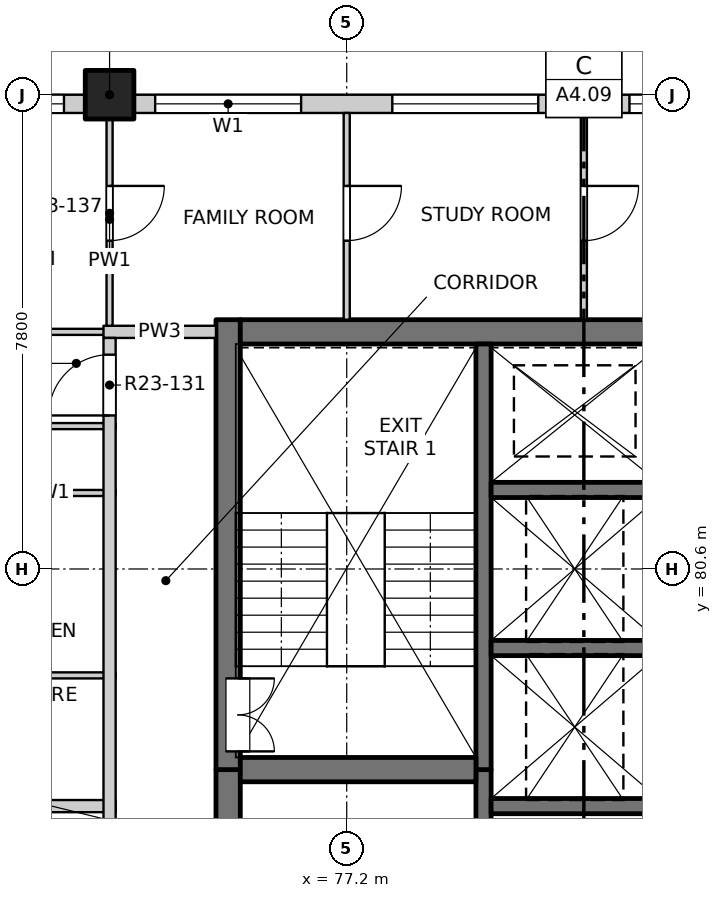
"""IFC4 building model, lengths in metres.
Left out: names, types, materials, properties, quantities, classifications, styles, units other than length and angle.
Written with IfcOpenShell. Run it as: python <this file> out.ifc"""

import sys

from ifc_helpers import new_model, si_unit, direction, frame, frame_2d, origin, origin_2d, place, context, subcontext, project, spatial, rectangle, extrude, element, fill, save


model = new_model("IFC4")
c1 = context("Model", 3, precision=1e-05, world=origin(), true_north=direction((0.0, 1.0)))
c2 = subcontext(c1, "Body", "Model", "MODEL_VIEW")
j1 = project(units=[si_unit("LENGTHUNIT", "METRE"), si_unit("PLANEANGLEUNIT", "RADIAN")], contexts=[c1])
p1 = place(None, origin())
s1 = spatial("IfcSite", under=j1, at=p1, CompositionType="ELEMENT")
p2 = place(p1, origin())
s2 = spatial("IfcBuilding", under=s1, at=p2, CompositionType="ELEMENT")
p3 = place(p2, frame((0.0, 0.0, 238.1)))
s3 = spatial("IfcBuildingStorey", under=s2, at=p3, CompositionType="ELEMENT", Elevation=238.1)
p4 = place(p3, frame((73.3, 88.4, -0.25), z_axis=(0.0, 0.0, 1.0), x_axis=(1.0, 0.0, 0.0)))
e1 = element("IfcColumn", 1, at=p4, inside=s3, PredefinedType="COLUMN", context=c2, shape_type="SweptSolid", body=[
    extrude(rectangle(XDim=0.8, YDim=0.8, at=origin_2d()), origin(), (0.0, 0.0, 1.0), 3.35),
])
p5 = place(p3, frame((75.25, 55.05, -0.25), z_axis=(0.0, 0.0, 1.0), x_axis=(0.0, 1.0, 0.0)))
e2 = element("IfcWall", 2, at=p5, inside=s3, PredefinedType="SOLIDWALL", context=c2, shape_type="SweptSolid", body=[
    extrude(rectangle(XDim=22.25, YDim=0.4, at=frame_2d((11.125, 0.0))), origin(), (0.0, 0.0, 1.0), 3.35),
])
p6 = place(p5, frame((7.4, 0.0, 0.25)))
e3 = element("IfcOpeningElement", 3, at=p6, cuts=e2, PredefinedType="OPENING", context=c2, shape_type="SweptSolid", body=[
    extrude(rectangle(XDim=0.9, YDim=2.1, at=frame_2d((0.45, 1.05))), frame((0.0, 0.21, 0.0), z_axis=(0.0, -1.0, 0.0), x_axis=(1.0, 0.0, 0.0)), (0.0, 0.0, 1.0), 0.42),
])
p7 = place(p5, frame((12.05, 0.0, 0.25)))
e4 = element("IfcOpeningElement", 4, at=p7, cuts=e2, PredefinedType="OPENING", context=c2, shape_type="SweptSolid", body=[
    extrude(rectangle(XDim=0.9, YDim=2.1, at=frame_2d((0.45, 1.05))), frame((0.0, 0.21, 0.0), z_axis=(0.0, -1.0, 0.0), x_axis=(1.0, 0.0, 0.0)), (0.0, 0.0, 1.0), 0.42),
])
p8 = place(p5, frame((16.55, 0.0, 0.25)))
e5 = element("IfcOpeningElement", 5, at=p8, cuts=e2, PredefinedType="OPENING", context=c2, shape_type="SweptSolid", body=[
    extrude(rectangle(XDim=0.9, YDim=2.1, at=frame_2d((0.45, 1.05))), frame((0.0, 0.21, 0.0), z_axis=(0.0, -1.0, 0.0), x_axis=(1.0, 0.0, 0.0)), (0.0, 0.0, 1.0), 0.42),
])
p9 = place(p5, frame((20.0, 0.0, 0.25)))
e6 = element("IfcOpeningElement", 6, at=p9, cuts=e2, PredefinedType="OPENING", context=c2, shape_type="SweptSolid", body=[
    extrude(rectangle(XDim=0.9, YDim=2.1, at=frame_2d((0.45, 1.05))), frame((0.0, 0.21, 0.0), z_axis=(0.0, -1.0, 0.0), x_axis=(1.0, 0.0, 0.0)), (0.0, 0.0, 1.0), 0.42),
])
p10 = place(p3, frame((75.25, 77.3, -0.25), z_axis=(0.0, 0.0, 1.0), x_axis=(0.0, 1.0, 0.0)))
e7 = element("IfcWall", 7, at=p10, inside=s3, PredefinedType="SOLIDWALL", context=c2, shape_type="SweptSolid", body=[
    extrude(rectangle(XDim=7.4, YDim=0.4, at=frame_2d((3.7, 0.0))), origin(), (0.0, 0.0, 1.0), 3.35),
])
p11 = place(p10, frame((0.3, 0.0, 0.25)))
e8 = element("IfcOpeningElement", 8, at=p11, cuts=e7, PredefinedType="OPENING", context=c2, shape_type="SweptSolid", body=[
    extrude(rectangle(XDim=1.2, YDim=2.1, at=frame_2d((0.6, 1.05))), frame((0.0, 0.21, 0.0), z_axis=(0.0, -1.0, 0.0), x_axis=(1.0, 0.0, 0.0)), (0.0, 0.0, 1.0), 0.42),
])
p12 = place(p3, frame((75.45, 84.5, -0.25), z_axis=(0.0, 0.0, 1.0), x_axis=(1.0, 0.0, 0.0)))
e9 = element("IfcWall", 9, at=p12, inside=s3, PredefinedType="SOLIDWALL", context=c2, shape_type="SweptSolid", body=[
    extrude(rectangle(XDim=19.1, YDim=0.4, at=frame_2d((9.55, 0.0))), origin(), (0.0, 0.0, 1.0), 3.35),
])
p13 = place(p3, frame((79.45, 60.975, -0.25), z_axis=(0.0, 0.0, 1.0), x_axis=(0.0, 1.0, 0.0)))
e10 = element("IfcWall", 10, at=p13, inside=s3, PredefinedType="SOLIDWALL", context=c2, shape_type="SweptSolid", body=[
    extrude(rectangle(XDim=16.325, YDim=0.25, at=frame_2d((8.163, 0.0))), origin(), (0.0, 0.0, 1.0), 3.35),
])
p14 = place(p3, frame((79.45, 77.3, -0.25), z_axis=(0.0, 0.0, 1.0), x_axis=(0.0, 1.0, 0.0)))
e11 = element("IfcWall", 11, at=p14, inside=s3, PredefinedType="SOLIDWALL", context=c2, shape_type="SweptSolid", body=[
    extrude(rectangle(XDim=7.0, YDim=0.25, at=frame_2d((3.5, 0.0))), origin(), (0.0, 0.0, 1.0), 3.35),
])
for number, where, z_axis, x_axis in (
    (12, (79.575, 76.7, -0.25), (0.0, 0.0, 1.0), (1.0, 0.0, 0.0)),
    (13, (79.575, 79.3, -0.25), (0.0, 0.0, 1.0), (1.0, 0.0, 0.0)),
    (14, (79.575, 81.9, -0.25), (0.0, 0.0, 1.0), (1.0, 0.0, 0.0)),
):
    element("IfcWall", number, at=place(p3, frame(where, z_axis=z_axis, x_axis=x_axis)), inside=s3, PredefinedType="SOLIDWALL", context=c2, shape_type="SweptSolid", body=[
        extrude(rectangle(XDim=3.0, YDim=0.25, at=frame_2d((1.5, 0.0))), origin(), (0.0, 0.0, 1.0), 3.35),
    ])
p15 = place(p3, frame((75.45, 77.3, -0.25), z_axis=(0.0, 0.0, 1.0), x_axis=(1.0, 0.0, 0.0)))
e15 = element("IfcWall", 15, at=p15, inside=s3, PredefinedType="SOLIDWALL", context=c2, shape_type="SweptSolid", body=[
    extrude(rectangle(XDim=3.875, YDim=0.4, at=frame_2d((1.938, 0.0))), origin(), (0.0, 0.0, 1.0), 3.35),
])
p16 = place(p3, frame((65.5, 88.25, 0.0), z_axis=(0.0, 0.0, 1.0), x_axis=(1.0, 0.0, 0.0)))
e16 = element("IfcWall", 16, at=p16, inside=s3, PredefinedType="SOLIDWALL", context=c2, shape_type="SweptSolid", body=[
    extrude(rectangle(XDim=7.4, YDim=0.3, at=frame_2d((3.7, 0.0))), origin(), (0.0, 0.0, 1.0), 3.1),
])
p17 = place(p16, frame((0.75, 0.0, 0.9)))
e17 = element("IfcOpeningElement", 17, at=p17, cuts=e16, PredefinedType="OPENING", context=c2, shape_type="SweptSolid", body=[
    extrude(rectangle(XDim=2.4, YDim=1.8, at=frame_2d((1.2, 0.9))), frame((0.0, 0.16, 0.0), z_axis=(0.0, -1.0, 0.0), x_axis=(1.0, 0.0, 0.0)), (0.0, 0.0, 1.0), 0.32),
])
p18 = place(p16, frame((4.65, 0.0, 0.9)))
e18 = element("IfcOpeningElement", 18, at=p18, cuts=e16, PredefinedType="OPENING", context=c2, shape_type="SweptSolid", body=[
    extrude(rectangle(XDim=2.4, YDim=1.8, at=frame_2d((1.2, 0.9))), frame((0.0, 0.16, 0.0), z_axis=(0.0, -1.0, 0.0), x_axis=(1.0, 0.0, 0.0)), (0.0, 0.0, 1.0), 0.32),
])
p19 = place(p3, frame((73.7, 88.25, 0.0), z_axis=(0.0, 0.0, 1.0), x_axis=(1.0, 0.0, 0.0)))
e19 = element("IfcWall", 19, at=p19, inside=s3, PredefinedType="SOLIDWALL", context=c2, shape_type="SweptSolid", body=[
    extrude(rectangle(XDim=22.6, YDim=0.3, at=frame_2d((11.3, 0.0))), origin(), (0.0, 0.0, 1.0), 3.1),
])
p20 = place(p19, frame((0.35, 0.0, 0.9)))
e20 = element("IfcOpeningElement", 20, at=p20, cuts=e19, PredefinedType="OPENING", context=c2, shape_type="SweptSolid", body=[
    extrude(rectangle(XDim=2.4, YDim=1.8, at=frame_2d((1.2, 0.9))), frame((0.0, 0.16, 0.0), z_axis=(0.0, -1.0, 0.0), x_axis=(1.0, 0.0, 0.0)), (0.0, 0.0, 1.0), 0.32),
])
p21 = place(p19, frame((4.25, 0.0, 0.9)))
e21 = element("IfcOpeningElement", 21, at=p21, cuts=e19, PredefinedType="OPENING", context=c2, shape_type="SweptSolid", body=[
    extrude(rectangle(XDim=2.4, YDim=1.8, at=frame_2d((1.2, 0.9))), frame((0.0, 0.16, 0.0), z_axis=(0.0, -1.0, 0.0), x_axis=(1.0, 0.0, 0.0)), (0.0, 0.0, 1.0), 0.32),
])
p22 = place(p19, frame((8.15, 0.0, 0.9)))
e22 = element("IfcOpeningElement", 22, at=p22, cuts=e19, PredefinedType="OPENING", context=c2, shape_type="SweptSolid", body=[
    extrude(rectangle(XDim=2.4, YDim=1.8, at=frame_2d((1.2, 0.9))), frame((0.0, 0.16, 0.0), z_axis=(0.0, -1.0, 0.0), x_axis=(1.0, 0.0, 0.0)), (0.0, 0.0, 1.0), 0.32),
])
p23 = place(p19, frame((12.05, 0.0, 0.9)))
e23 = element("IfcOpeningElement", 23, at=p23, cuts=e19, PredefinedType="OPENING", context=c2, shape_type="SweptSolid", body=[
    extrude(rectangle(XDim=2.4, YDim=1.8, at=frame_2d((1.2, 0.9))), frame((0.0, 0.16, 0.0), z_axis=(0.0, -1.0, 0.0), x_axis=(1.0, 0.0, 0.0)), (0.0, 0.0, 1.0), 0.32),
])
p24 = place(p19, frame((15.95, 0.0, 0.9)))
e24 = element("IfcOpeningElement", 24, at=p24, cuts=e19, PredefinedType="OPENING", context=c2, shape_type="SweptSolid", body=[
    extrude(rectangle(XDim=2.4, YDim=1.8, at=frame_2d((1.2, 0.9))), frame((0.0, 0.16, 0.0), z_axis=(0.0, -1.0, 0.0), x_axis=(1.0, 0.0, 0.0)), (0.0, 0.0, 1.0), 0.32),
])
p25 = place(p19, frame((19.85, 0.0, 0.9)))
e25 = element("IfcOpeningElement", 25, at=p25, cuts=e19, PredefinedType="OPENING", context=c2, shape_type="SweptSolid", body=[
    extrude(rectangle(XDim=2.4, YDim=1.8, at=frame_2d((1.2, 0.9))), frame((0.0, 0.16, 0.0), z_axis=(0.0, -1.0, 0.0), x_axis=(1.0, 0.0, 0.0)), (0.0, 0.0, 1.0), 0.32),
])
p26 = place(p3, frame((61.9, 76.7, 0.0), z_axis=(0.0, 0.0, 1.0), x_axis=(1.0, 0.0, 0.0)))
e26 = element("IfcWall", 26, at=p26, inside=s3, PredefinedType="PARTITIONING", context=c2, shape_type="SweptSolid", body=[
    extrude(rectangle(XDim=11.5, YDim=0.2, at=frame_2d((5.75, 0.0))), origin(), (0.0, 0.0, 1.0), 3.1),
])
for number, where, z_axis, x_axis in (
    (27, (71.18, 78.85, 0.0), (0.0, 0.0, 1.0), (1.0, 0.0, 0.0)),
    (28, (71.18, 81.85, 0.0), (0.0, 0.0, 1.0), (1.0, 0.0, 0.0)),
    (29, (71.18, 82.95, 0.0), (0.0, 0.0, 1.0), (1.0, 0.0, 0.0)),
):
    element("IfcWall", number, at=place(p3, frame(where, z_axis=z_axis, x_axis=x_axis)), inside=s3, PredefinedType="PARTITIONING", context=c2, shape_type="SweptSolid", body=[
        extrude(rectangle(XDim=2.22, YDim=0.1, at=frame_2d((1.11, 0.0))), origin(), (0.0, 0.0, 1.0), 3.1),
    ])
p27 = place(p3, frame((61.9, 84.5, 0.0), z_axis=(0.0, 0.0, 1.0), x_axis=(1.0, 0.0, 0.0)))
e30 = element("IfcWall", 30, at=p27, inside=s3, PredefinedType="PARTITIONING", context=c2, shape_type="SweptSolid", body=[
    extrude(rectangle(XDim=11.5, YDim=0.1, at=frame_2d((5.75, 0.0))), origin(), (0.0, 0.0, 1.0), 3.1),
])
p28 = place(p27, frame((7.965, 0.0, 0.0)))
e31 = element("IfcOpeningElement", 31, at=p28, cuts=e30, PredefinedType="OPENING", context=c2, shape_type="SweptSolid", body=[
    extrude(rectangle(XDim=0.9, YDim=2.1, at=frame_2d((0.45, 1.05))), frame((0.0, 0.06, 0.0), z_axis=(0.0, -1.0, 0.0), x_axis=(1.0, 0.0, 0.0)), (0.0, 0.0, 1.0), 0.12),
])
p29 = place(p3, frame((73.2, 84.5, 0.0), z_axis=(0.0, 0.0, 1.0), x_axis=(1.0, 0.0, 0.0)))
e32 = element("IfcWall", 32, at=p29, inside=s3, PredefinedType="PARTITIONING", context=c2, shape_type="SweptSolid", body=[
    extrude(rectangle(XDim=1.85, YDim=0.2, at=frame_2d((0.925, 0.0))), origin(), (0.0, 0.0, 1.0), 3.1),
])
p30 = place(p3, frame((73.3, 49.5, 0.0), z_axis=(0.0, 0.0, 1.0), x_axis=(0.0, 1.0, 0.0)))
e33 = element("IfcWall", 33, at=p30, inside=s3, PredefinedType="PARTITIONING", context=c2, shape_type="SweptSolid", body=[
    extrude(rectangle(XDim=34.9, YDim=0.2, at=frame_2d((17.45, 0.0))), origin(), (0.0, 0.0, 1.0), 3.1),
])
p31 = place(p30, frame((3.075, 0.0, 0.0)))
e34 = element("IfcOpeningElement", 34, at=p31, cuts=e33, PredefinedType="OPENING", context=c2, shape_type="SweptSolid", body=[
    extrude(rectangle(XDim=1.0, YDim=2.1, at=frame_2d((0.5, 1.05))), frame((0.0, 0.11, 0.0), z_axis=(0.0, -1.0, 0.0), x_axis=(1.0, 0.0, 0.0)), (0.0, 0.0, 1.0), 0.22),
])
p32 = place(p30, frame((14.575, 0.0, 0.0)))
e35 = element("IfcOpeningElement", 35, at=p32, cuts=e33, PredefinedType="OPENING", context=c2, shape_type="SweptSolid", body=[
    extrude(rectangle(XDim=1.0, YDim=2.1, at=frame_2d((0.5, 1.05))), frame((0.0, 0.11, 0.0), z_axis=(0.0, -1.0, 0.0), x_axis=(1.0, 0.0, 0.0)), (0.0, 0.0, 1.0), 0.22),
])
p33 = place(p30, frame((33.625, 0.0, 0.0)))
e36 = element("IfcOpeningElement", 36, at=p33, cuts=e33, PredefinedType="OPENING", context=c2, shape_type="SweptSolid", body=[
    extrude(rectangle(XDim=1.0, YDim=2.1, at=frame_2d((0.5, 1.05))), frame((0.0, 0.11, 0.0), z_axis=(0.0, -1.0, 0.0), x_axis=(1.0, 0.0, 0.0)), (0.0, 0.0, 1.0), 0.22),
])
p34 = place(p3, frame((73.3, 84.6, 0.0), z_axis=(0.0, 0.0, 1.0), x_axis=(0.0, 1.0, 0.0)))
e37 = element("IfcWall", 37, at=p34, inside=s3, PredefinedType="PARTITIONING", context=c2, shape_type="SweptSolid", body=[
    extrude(rectangle(XDim=3.5, YDim=0.1, at=frame_2d((1.75, 0.0))), origin(), (0.0, 0.0, 1.0), 3.1),
])
p35 = place(p34, frame((1.4, 0.0, 0.0)))
e38 = element("IfcOpeningElement", 38, at=p35, cuts=e37, PredefinedType="OPENING", context=c2, shape_type="SweptSolid", body=[
    extrude(rectangle(XDim=0.9, YDim=2.1, at=frame_2d((0.45, 1.05))), frame((0.0, 0.06, 0.0), z_axis=(0.0, -1.0, 0.0), x_axis=(1.0, 0.0, 0.0)), (0.0, 0.0, 1.0), 0.12),
])
p36 = place(p3, frame((77.2, 84.7, 0.0), z_axis=(0.0, 0.0, 1.0), x_axis=(0.0, 1.0, 0.0)))
e39 = element("IfcWall", 39, at=p36, inside=s3, PredefinedType="PARTITIONING", context=c2, shape_type="SweptSolid", body=[
    extrude(rectangle(XDim=3.4, YDim=0.1, at=frame_2d((1.7, 0.0))), origin(), (0.0, 0.0, 1.0), 3.1),
])
p37 = place(p36, frame((1.3, 0.0, 0.0)))
e40 = element("IfcOpeningElement", 40, at=p37, cuts=e39, PredefinedType="OPENING", context=c2, shape_type="SweptSolid", body=[
    extrude(rectangle(XDim=0.9, YDim=2.1, at=frame_2d((0.45, 1.05))), frame((0.0, 0.06, 0.0), z_axis=(0.0, -1.0, 0.0), x_axis=(1.0, 0.0, 0.0)), (0.0, 0.0, 1.0), 0.12),
])
p38 = place(p3, frame((81.1, 84.7, 0.0), z_axis=(0.0, 0.0, 1.0), x_axis=(0.0, 1.0, 0.0)))
e41 = element("IfcWall", 41, at=p38, inside=s3, PredefinedType="PARTITIONING", context=c2, shape_type="SweptSolid", body=[
    extrude(rectangle(XDim=3.4, YDim=0.1, at=frame_2d((1.7, 0.0))), origin(), (0.0, 0.0, 1.0), 3.1),
])
p39 = place(p38, frame((1.3, 0.0, 0.0)))
e42 = element("IfcOpeningElement", 42, at=p39, cuts=e41, PredefinedType="OPENING", context=c2, shape_type="SweptSolid", body=[
    extrude(rectangle(XDim=0.9, YDim=2.1, at=frame_2d((0.45, 1.05))), frame((0.0, 0.06, 0.0), z_axis=(0.0, -1.0, 0.0), x_axis=(1.0, 0.0, 0.0)), (0.0, 0.0, 1.0), 0.12),
])
p40 = place(p18, origin())
e43 = element("IfcWindow", 43, at=p40, inside=s3, PartitioningType="DOUBLE_PANEL_VERTICAL", PredefinedType="WINDOW", context=c2, shape_type="SweptSolid", body=[
    extrude(rectangle(XDim=2.4, YDim=1.8, at=frame_2d((1.2, 0.9))), frame((0.0, 0.03, 0.0), z_axis=(0.0, -1.0, 0.0), x_axis=(1.0, 0.0, 0.0)), (0.0, 0.0, 1.0), 0.06),
])
fill(e18, e43)
p41 = place(p20, origin())
e44 = element("IfcWindow", 44, at=p41, inside=s3, PartitioningType="DOUBLE_PANEL_VERTICAL", PredefinedType="WINDOW", context=c2, shape_type="SweptSolid", body=[
    extrude(rectangle(XDim=2.4, YDim=1.8, at=frame_2d((1.2, 0.9))), frame((0.0, 0.03, 0.0), z_axis=(0.0, -1.0, 0.0), x_axis=(1.0, 0.0, 0.0)), (0.0, 0.0, 1.0), 0.06),
])
fill(e20, e44)
p42 = place(p21, origin())
e45 = element("IfcWindow", 45, at=p42, inside=s3, PartitioningType="DOUBLE_PANEL_VERTICAL", PredefinedType="WINDOW", context=c2, shape_type="SweptSolid", body=[
    extrude(rectangle(XDim=2.4, YDim=1.8, at=frame_2d((1.2, 0.9))), frame((0.0, 0.03, 0.0), z_axis=(0.0, -1.0, 0.0), x_axis=(1.0, 0.0, 0.0)), (0.0, 0.0, 1.0), 0.06),
])
fill(e21, e45)
p43 = place(p22, origin())
e46 = element("IfcWindow", 46, at=p43, inside=s3, PartitioningType="DOUBLE_PANEL_VERTICAL", PredefinedType="WINDOW", context=c2, shape_type="SweptSolid", body=[
    extrude(rectangle(XDim=2.4, YDim=1.8, at=frame_2d((1.2, 0.9))), frame((0.0, 0.03, 0.0), z_axis=(0.0, -1.0, 0.0), x_axis=(1.0, 0.0, 0.0)), (0.0, 0.0, 1.0), 0.06),
])
fill(e22, e46)
p44 = place(p11, origin())
e47 = element("IfcDoor", 47, at=p44, inside=s3, OperationType="DOUBLE_DOOR_SINGLE_SWING", PredefinedType="DOOR", context=c2, shape_type="SweptSolid", body=[
    extrude(rectangle(XDim=1.2, YDim=2.1, at=frame_2d((0.6, 1.05))), frame((0.0, -0.135, 0.0), z_axis=(0.0, -1.0, 0.0), x_axis=(1.0, 0.0, 0.0)), (0.0, 0.0, 1.0), 0.05),
])
fill(e8, e47)
p45 = place(p33, origin())
e48 = element("IfcDoor", 48, at=p45, inside=s3, OperationType="SINGLE_SWING_RIGHT", PredefinedType="DOOR", context=c2, shape_type="SweptSolid", body=[
    extrude(rectangle(XDim=1.0, YDim=2.1, at=frame_2d((0.5, 1.05))), frame((0.0, 0.025, 0.0), z_axis=(0.0, -1.0, 0.0), x_axis=(1.0, 0.0, 0.0)), (0.0, 0.0, 1.0), 0.05),
])
fill(e36, e48)
p46 = place(p35, origin())
e49 = element("IfcDoor", 49, at=p46, inside=s3, OperationType="SINGLE_SWING_LEFT", PredefinedType="DOOR", context=c2, shape_type="SweptSolid", body=[
    extrude(rectangle(XDim=0.9, YDim=2.1, at=frame_2d((0.45, 1.05))), frame((0.0, 0.025, 0.0), z_axis=(0.0, -1.0, 0.0), x_axis=(1.0, 0.0, 0.0)), (0.0, 0.0, 1.0), 0.05),
])
fill(e38, e49)
p47 = place(p37, origin())
e50 = element("IfcDoor", 50, at=p47, inside=s3, OperationType="SINGLE_SWING_LEFT", PredefinedType="DOOR", context=c2, shape_type="SweptSolid", body=[
    extrude(rectangle(XDim=0.9, YDim=2.1, at=frame_2d((0.45, 1.05))), frame((0.0, 0.025, 0.0), z_axis=(0.0, -1.0, 0.0), x_axis=(1.0, 0.0, 0.0)), (0.0, 0.0, 1.0), 0.05),
])
fill(e40, e50)
p48 = place(p39, origin())
e51 = element("IfcDoor", 51, at=p48, inside=s3, OperationType="SINGLE_SWING_LEFT", PredefinedType="DOOR", context=c2, shape_type="SweptSolid", body=[
    extrude(rectangle(XDim=0.9, YDim=2.1, at=frame_2d((0.45, 1.05))), frame((0.0, 0.025, 0.0), z_axis=(0.0, -1.0, 0.0), x_axis=(1.0, 0.0, 0.0)), (0.0, 0.0, 1.0), 0.05),
])
fill(e42, e51)
save(model, sys.argv[1])
